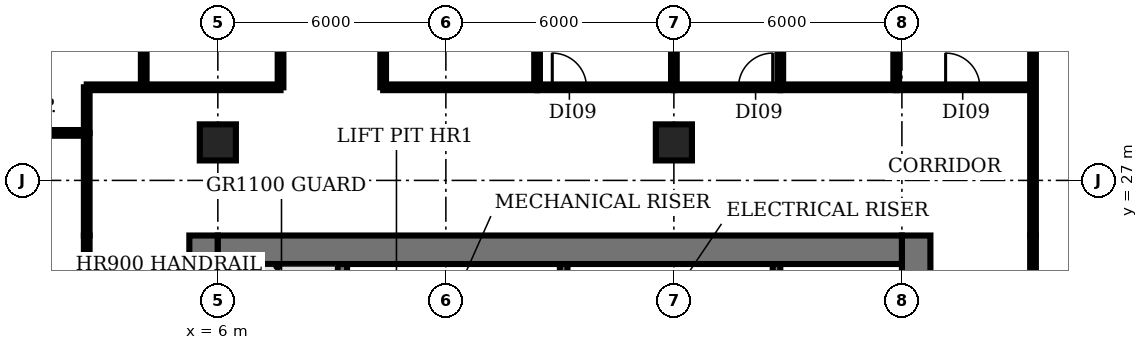
"""IFC4 building model, lengths in metres.
Left out: names, types, materials, properties, quantities, classifications, styles, units other than length and angle.
Written with IfcOpenShell. Run it as: python <this file> out.ifc"""

import sys

from ifc_helpers import new_model, si_unit, direction, frame, frame_2d, origin, origin_2d, place, context, subcontext, project, spatial, rectangle, extrude, element, fill, save


model = new_model("IFC4")
c1 = context("Model", 3, precision=1e-05, world=origin(), true_north=direction((0.0, 1.0)))
c2 = subcontext(c1, "Body", "Model", "MODEL_VIEW")
j1 = project(units=[si_unit("LENGTHUNIT", "METRE"), si_unit("PLANEANGLEUNIT", "RADIAN")], contexts=[c1])
p1 = place(None, origin())
s1 = spatial("IfcSite", under=j1, at=p1, CompositionType="ELEMENT")
p2 = place(p1, origin())
s2 = spatial("IfcBuilding", under=s1, at=p2, CompositionType="ELEMENT")
p3 = place(p2, frame((0.0, 0.0, 134.0)))
s3 = spatial("IfcBuildingStorey", under=s2, at=p3, CompositionType="ELEMENT", Elevation=134.0)
for number, where, z_axis, x_axis in (
    (1, (6.0, 28.0, 0.0), (0.0, 0.0, 1.0), (1.0, 0.0, 0.0)),
    (2, (18.0, 28.0, 0.0), (0.0, 0.0, 1.0), (1.0, 0.0, 0.0)),
):
    element("IfcColumn", number, at=place(p3, frame(where, z_axis=z_axis, x_axis=x_axis)), inside=s3, PredefinedType="COLUMN", context=c2, shape_type="SweptSolid", body=[
        extrude(rectangle(XDim=0.95, YDim=0.95, at=origin_2d()), origin(), (0.0, 0.0, 1.0), 3.2),
    ])
p4 = place(p3, frame((9.275, 18.375, 0.0), z_axis=(0.0, 0.0, 1.0), x_axis=(0.0, 1.0, 0.0)))
e3 = element("IfcWall", 3, at=p4, inside=s3, PredefinedType="SHEAR", context=c2, shape_type="SweptSolid", body=[
    extrude(rectangle(XDim=6.425, YDim=0.25, at=frame_2d((3.212, 0.0))), origin(), (0.0, 0.0, 1.0), 3.8),
])
for number, where, z_axis, x_axis in (
    (4, (15.1, 22.9, 0.0), (0.0, 0.0, 1.0), (0.0, 1.0, 0.0)),
    (5, (20.7, 22.9, 0.0), (0.0, 0.0, 1.0), (0.0, 1.0, 0.0)),
):
    element("IfcWall", number, at=place(p3, frame(where, z_axis=z_axis, x_axis=x_axis)), inside=s3, PredefinedType="SHEAR", context=c2, shape_type="SweptSolid", body=[
        extrude(rectangle(XDim=1.9, YDim=0.2, at=frame_2d((0.95, 0.0))), origin(), (0.0, 0.0, 1.0), 3.8),
    ])
p5 = place(p3, frame((5.625, 4.52, 0.0), z_axis=(0.0, 0.0, 1.0), x_axis=(0.0, 1.0, 0.0)))
e6 = element("IfcWall", 6, at=p5, inside=s3, PredefinedType="SHEAR", context=c2, shape_type="SweptSolid", body=[
    extrude(rectangle(XDim=21.03, YDim=0.75, at=frame_2d((10.515, 0.0))), origin(), (0.0, 0.0, 1.0), 3.8),
])
p6 = place(p5, frame((1.13, 0.0, 0.0)))
e7 = element("IfcOpeningElement", 7, at=p6, cuts=e6, PredefinedType="OPENING", context=c2, shape_type="SweptSolid", body=[
    extrude(rectangle(XDim=1.5, YDim=2.1, at=frame_2d((0.75, 1.05))), frame((0.0, 0.385, 0.0), z_axis=(0.0, -1.0, 0.0), x_axis=(1.0, 0.0, 0.0)), (0.0, 0.0, 1.0), 0.77),
])
p7 = place(p5, frame((7.58, 0.0, 0.0)))
e8 = element("IfcOpeningElement", 8, at=p7, cuts=e6, PredefinedType="OPENING", context=c2, shape_type="SweptSolid", body=[
    extrude(rectangle(XDim=1.2, YDim=2.1, at=frame_2d((0.6, 1.05))), frame((0.0, 0.385, 0.0), z_axis=(0.0, -1.0, 0.0), x_axis=(1.0, 0.0, 0.0)), (0.0, 0.0, 1.0), 0.77),
])
p8 = place(p5, frame((14.13, 0.0, 0.0)))
e9 = element("IfcOpeningElement", 9, at=p8, cuts=e6, PredefinedType="OPENING", context=c2, shape_type="SweptSolid", body=[
    extrude(rectangle(XDim=1.2, YDim=2.1, at=frame_2d((0.6, 1.05))), frame((0.0, 0.385, 0.0), z_axis=(0.0, -1.0, 0.0), x_axis=(1.0, 0.0, 0.0)), (0.0, 0.0, 1.0), 0.77),
])
p9 = place(p3, frame((24.375, 25.55, 0.0), z_axis=(0.0, 0.0, 1.0), x_axis=(0.0, -1.0, 0.0)))
e10 = element("IfcWall", 10, at=p9, inside=s3, PredefinedType="SHEAR", context=c2, shape_type="SweptSolid", body=[
    extrude(rectangle(XDim=21.08, YDim=0.75, at=frame_2d((10.54, 0.0))), origin(), (0.0, 0.0, 1.0), 3.8),
])
p10 = place(p9, frame((18.4, 0.0, 0.0)))
e11 = element("IfcOpeningElement", 11, at=p10, cuts=e10, PredefinedType="OPENING", context=c2, shape_type="SweptSolid", body=[
    extrude(rectangle(XDim=1.5, YDim=2.1, at=frame_2d((0.75, 1.05))), frame((0.0, 0.385, 0.0), z_axis=(0.0, -1.0, 0.0), x_axis=(1.0, 0.0, 0.0)), (0.0, 0.0, 1.0), 0.77),
])
p11 = place(p9, frame((12.3, 0.0, 0.0)))
e12 = element("IfcOpeningElement", 12, at=p11, cuts=e10, PredefinedType="OPENING", context=c2, shape_type="SweptSolid", body=[
    extrude(rectangle(XDim=0.9, YDim=2.1, at=frame_2d((0.45, 1.05))), frame((0.0, 0.385, 0.0), z_axis=(0.0, -1.0, 0.0), x_axis=(1.0, 0.0, 0.0)), (0.0, 0.0, 1.0), 0.77),
])
p12 = place(p9, frame((6.3, 0.0, 0.0)))
e13 = element("IfcOpeningElement", 13, at=p12, cuts=e10, PredefinedType="OPENING", context=c2, shape_type="SweptSolid", body=[
    extrude(rectangle(XDim=2.0, YDim=2.1, at=frame_2d((1.0, 1.05))), frame((0.0, 0.385, 0.0), z_axis=(0.0, -1.0, 0.0), x_axis=(1.0, 0.0, 0.0)), (0.0, 0.0, 1.0), 0.77),
])
p13 = place(p3, frame((6.0, 25.175, 0.0), z_axis=(0.0, 0.0, 1.0), x_axis=(1.0, 0.0, 0.0)))
e14 = element("IfcWall", 14, at=p13, inside=s3, PredefinedType="SHEAR", context=c2, shape_type="SweptSolid", body=[
    extrude(rectangle(XDim=18.0, YDim=0.75, at=frame_2d((9.0, 0.0))), origin(), (0.0, 0.0, 1.0), 3.8),
])
p14 = place(p3, frame((-1.62, 28.25, 0.0), z_axis=(0.0, 0.0, 1.0), x_axis=(1.0, 0.0, 0.0)))
e15 = element("IfcWall", 15, at=p14, inside=s3, PredefinedType="PARTITIONING", context=c2, shape_type="SweptSolid", body=[
    extrude(rectangle(XDim=4.17, YDim=0.15, at=frame_2d((2.085, 0.0))), origin(), (0.0, 0.0, 1.0), 2.78),
])
p15 = place(p3, frame((2.55, 6.03, 0.0), z_axis=(0.0, 0.0, 1.0), x_axis=(0.0, 1.0, 0.0)))
e16 = element("IfcWall", 16, at=p15, inside=s3, PredefinedType="PARTITIONING", context=c2, shape_type="SweptSolid", body=[
    extrude(rectangle(XDim=19.52, YDim=0.15, at=frame_2d((9.76, 0.0))), origin(), (0.0, 0.0, 1.0), 2.78),
])
p16 = place(p15, frame((7.62, 0.0, 0.0)))
e17 = element("IfcOpeningElement", 17, at=p16, cuts=e16, PredefinedType="OPENING", context=c2, shape_type="SweptSolid", body=[
    extrude(rectangle(XDim=1.2, YDim=2.1, at=frame_2d((0.6, 1.05))), frame((0.0, 0.085, 0.0), z_axis=(0.0, -1.0, 0.0), x_axis=(1.0, 0.0, 0.0)), (0.0, 0.0, 1.0), 0.17),
])
p17 = place(p3, frame((2.55, 25.55, 0.0), z_axis=(0.0, 0.0, 1.0), x_axis=(0.0, 1.0, 0.0)))
e18 = element("IfcWall", 18, at=p17, inside=s3, PredefinedType="PARTITIONING", context=c2, shape_type="SweptSolid", body=[
    extrude(rectangle(XDim=2.7, YDim=0.15, at=frame_2d((1.35, 0.0))), origin(), (0.0, 0.0, 1.0), 2.78),
])
p18 = place(p3, frame((2.55, 28.25, 0.0), z_axis=(0.0, 0.0, 1.0), x_axis=(0.0, 1.0, 0.0)))
e19 = element("IfcWall", 19, at=p18, inside=s3, PredefinedType="PARTITIONING", context=c2, shape_type="SweptSolid", body=[
    extrude(rectangle(XDim=1.2, YDim=0.15, at=frame_2d((0.6, 0.0))), origin(), (0.0, 0.0, 1.0), 2.78),
])
p19 = place(p3, frame((2.55, 29.45, 0.0), z_axis=(0.0, 0.0, 1.0), x_axis=(1.0, 0.0, 0.0)))
e20 = element("IfcWall", 20, at=p19, inside=s3, PredefinedType="PARTITIONING", context=c2, shape_type="SweptSolid", body=[
    extrude(rectangle(XDim=5.1, YDim=0.15, at=frame_2d((2.55, 0.0))), origin(), (0.0, 0.0, 1.0), 2.78),
])
p20 = place(p3, frame((4.05, 29.45, 0.0), z_axis=(0.0, 0.0, 1.0), x_axis=(0.0, 1.0, 0.0)))
e21 = element("IfcWall", 21, at=p20, inside=s3, PredefinedType="PARTITIONING", context=c2, shape_type="SweptSolid", body=[
    extrude(rectangle(XDim=4.8, YDim=0.15, at=frame_2d((2.4, 0.0))), origin(), (0.0, 0.0, 1.0), 2.78),
])
p21 = place(p3, frame((7.65, 29.45, 0.0), z_axis=(0.0, 0.0, 1.0), x_axis=(0.0, 1.0, 0.0)))
e22 = element("IfcWall", 22, at=p21, inside=s3, PredefinedType="PARTITIONING", context=c2, shape_type="SweptSolid", body=[
    extrude(rectangle(XDim=4.8, YDim=0.15, at=frame_2d((2.4, 0.0))), origin(), (0.0, 0.0, 1.0), 2.78),
])
p22 = place(p21, frame((1.9, 0.0, 0.0)))
e23 = element("IfcOpeningElement", 23, at=p22, cuts=e22, PredefinedType="OPENING", context=c2, shape_type="SweptSolid", body=[
    extrude(rectangle(XDim=0.9, YDim=2.1, at=frame_2d((0.45, 1.05))), frame((0.0, 0.085, 0.0), z_axis=(0.0, -1.0, 0.0), x_axis=(1.0, 0.0, 0.0)), (0.0, 0.0, 1.0), 0.17),
])
p23 = place(p3, frame((10.35, 29.45, 0.0), z_axis=(0.0, 0.0, 1.0), x_axis=(0.0, 1.0, 0.0)))
e24 = element("IfcWall", 24, at=p23, inside=s3, PredefinedType="PARTITIONING", context=c2, shape_type="SweptSolid", body=[
    extrude(rectangle(XDim=4.8, YDim=0.15, at=frame_2d((2.4, 0.0))), origin(), (0.0, 0.0, 1.0), 2.78),
])
p24 = place(p3, frame((10.35, 29.45, 0.0), z_axis=(0.0, 0.0, 1.0), x_axis=(1.0, 0.0, 0.0)))
e25 = element("IfcWall", 25, at=p24, inside=s3, PredefinedType="PARTITIONING", context=c2, shape_type="SweptSolid", body=[
    extrude(rectangle(XDim=4.05, YDim=0.15, at=frame_2d((2.025, 0.0))), origin(), (0.0, 0.0, 1.0), 2.78),
])
p25 = place(p3, frame((14.4, 29.45, 0.0), z_axis=(0.0, 0.0, 1.0), x_axis=(0.0, 1.0, 0.0)))
e26 = element("IfcWall", 26, at=p25, inside=s3, PredefinedType="PARTITIONING", context=c2, shape_type="SweptSolid", body=[
    extrude(rectangle(XDim=4.8, YDim=0.15, at=frame_2d((2.4, 0.0))), origin(), (0.0, 0.0, 1.0), 2.78),
])
p26 = place(p3, frame((14.4, 29.45, 0.0), z_axis=(0.0, 0.0, 1.0), x_axis=(1.0, 0.0, 0.0)))
e27 = element("IfcWall", 27, at=p26, inside=s3, PredefinedType="PARTITIONING", context=c2, shape_type="SweptSolid", body=[
    extrude(rectangle(XDim=3.6, YDim=0.15, at=frame_2d((1.8, 0.0))), origin(), (0.0, 0.0, 1.0), 2.78),
])
p27 = place(p26, frame((0.4, 0.0, 0.0)))
e28 = element("IfcOpeningElement", 28, at=p27, cuts=e27, PredefinedType="OPENING", context=c2, shape_type="SweptSolid", body=[
    extrude(rectangle(XDim=0.9, YDim=2.1, at=frame_2d((0.45, 1.05))), frame((0.0, 0.085, 0.0), z_axis=(0.0, -1.0, 0.0), x_axis=(1.0, 0.0, 0.0)), (0.0, 0.0, 1.0), 0.17),
])
p28 = place(p3, frame((18.0, 29.45, 0.0), z_axis=(0.0, 0.0, 1.0), x_axis=(0.0, 1.0, 0.0)))
e29 = element("IfcWall", 29, at=p28, inside=s3, PredefinedType="PARTITIONING", context=c2, shape_type="SweptSolid", body=[
    extrude(rectangle(XDim=4.8, YDim=0.15, at=frame_2d((2.4, 0.0))), origin(), (0.0, 0.0, 1.0), 2.78),
])
p29 = place(p3, frame((18.0, 29.45, 0.0), z_axis=(0.0, 0.0, 1.0), x_axis=(1.0, 0.0, 0.0)))
e30 = element("IfcWall", 30, at=p29, inside=s3, PredefinedType="PARTITIONING", context=c2, shape_type="SweptSolid", body=[
    extrude(rectangle(XDim=2.8, YDim=0.15, at=frame_2d((1.4, 0.0))), origin(), (0.0, 0.0, 1.0), 2.78),
])
p30 = place(p29, frame((1.7, 0.0, 0.0)))
e31 = element("IfcOpeningElement", 31, at=p30, cuts=e30, PredefinedType="OPENING", context=c2, shape_type="SweptSolid", body=[
    extrude(rectangle(XDim=0.9, YDim=2.1, at=frame_2d((0.45, 1.05))), frame((0.0, 0.085, 0.0), z_axis=(0.0, -1.0, 0.0), x_axis=(1.0, 0.0, 0.0)), (0.0, 0.0, 1.0), 0.17),
])
p31 = place(p3, frame((20.8, 29.45, 0.0), z_axis=(0.0, 0.0, 1.0), x_axis=(0.0, 1.0, 0.0)))
e32 = element("IfcWall", 32, at=p31, inside=s3, PredefinedType="PARTITIONING", context=c2, shape_type="SweptSolid", body=[
    extrude(rectangle(XDim=4.8, YDim=0.15, at=frame_2d((2.4, 0.0))), origin(), (0.0, 0.0, 1.0), 2.78),
])
p32 = place(p3, frame((20.8, 29.45, 0.0), z_axis=(0.0, 0.0, 1.0), x_axis=(1.0, 0.0, 0.0)))
e33 = element("IfcWall", 33, at=p32, inside=s3, PredefinedType="PARTITIONING", context=c2, shape_type="SweptSolid", body=[
    extrude(rectangle(XDim=3.05, YDim=0.15, at=frame_2d((1.525, 0.0))), origin(), (0.0, 0.0, 1.0), 2.78),
])
p33 = place(p3, frame((23.85, 29.45, 0.0), z_axis=(0.0, 0.0, 1.0), x_axis=(0.0, 1.0, 0.0)))
e34 = element("IfcWall", 34, at=p33, inside=s3, PredefinedType="PARTITIONING", context=c2, shape_type="SweptSolid", body=[
    extrude(rectangle(XDim=4.8, YDim=0.15, at=frame_2d((2.4, 0.0))), origin(), (0.0, 0.0, 1.0), 2.78),
])
p34 = place(p3, frame((23.85, 29.45, 0.0), z_axis=(0.0, 0.0, 1.0), x_axis=(1.0, 0.0, 0.0)))
e35 = element("IfcWall", 35, at=p34, inside=s3, PredefinedType="PARTITIONING", context=c2, shape_type="SweptSolid", body=[
    extrude(rectangle(XDim=3.6, YDim=0.15, at=frame_2d((1.8, 0.0))), origin(), (0.0, 0.0, 1.0), 2.78),
])
p35 = place(p34, frame((1.3, 0.0, 0.0)))
e36 = element("IfcOpeningElement", 36, at=p35, cuts=e35, PredefinedType="OPENING", context=c2, shape_type="SweptSolid", body=[
    extrude(rectangle(XDim=0.9, YDim=2.1, at=frame_2d((0.45, 1.05))), frame((0.0, 0.085, 0.0), z_axis=(0.0, -1.0, 0.0), x_axis=(1.0, 0.0, 0.0)), (0.0, 0.0, 1.0), 0.17),
])
p36 = place(p3, frame((27.45, 25.55, 0.0), z_axis=(0.0, 0.0, 1.0), x_axis=(0.0, -1.0, 0.0)))
e37 = element("IfcWall", 37, at=p36, inside=s3, PredefinedType="PARTITIONING", context=c2, shape_type="SweptSolid", body=[
    extrude(rectangle(XDim=16.45, YDim=0.15, at=frame_2d((8.225, 0.0))), origin(), (0.0, 0.0, 1.0), 2.78),
])
p37 = place(p36, frame((7.55, 0.0, 0.0)))
e38 = element("IfcOpeningElement", 38, at=p37, cuts=e37, PredefinedType="OPENING", context=c2, shape_type="SweptSolid", body=[
    extrude(rectangle(XDim=1.2, YDim=2.1, at=frame_2d((0.6, 1.05))), frame((0.0, 0.085, 0.0), z_axis=(0.0, -1.0, 0.0), x_axis=(1.0, 0.0, 0.0)), (0.0, 0.0, 1.0), 0.17),
])
p38 = place(p3, frame((27.45, 25.55, 0.0), z_axis=(0.0, 0.0, 1.0), x_axis=(0.0, 1.0, 0.0)))
e39 = element("IfcWall", 39, at=p38, inside=s3, PredefinedType="PARTITIONING", context=c2, shape_type="SweptSolid", body=[
    extrude(rectangle(XDim=6.47, YDim=0.15, at=frame_2d((3.235, 0.0))), origin(), (0.0, 0.0, 1.0), 2.78),
])
p39 = place(p27, origin())
e40 = element("IfcDoor", 40, at=p39, inside=s3, OperationType="SINGLE_SWING_LEFT", PredefinedType="DOOR", context=c2, shape_type="SweptSolid", body=[
    extrude(rectangle(XDim=0.9, YDim=2.1, at=frame_2d((0.45, 1.05))), frame((0.0, 0.025, 0.0), z_axis=(0.0, -1.0, 0.0), x_axis=(1.0, 0.0, 0.0)), (0.0, 0.0, 1.0), 0.05),
])
fill(e28, e40)
p40 = place(p30, origin())
e41 = element("IfcDoor", 41, at=p40, inside=s3, OperationType="SINGLE_SWING_RIGHT", PredefinedType="DOOR", context=c2, shape_type="SweptSolid", body=[
    extrude(rectangle(XDim=0.9, YDim=2.1, at=frame_2d((0.45, 1.05))), frame((0.0, 0.025, 0.0), z_axis=(0.0, -1.0, 0.0), x_axis=(1.0, 0.0, 0.0)), (0.0, 0.0, 1.0), 0.05),
])
fill(e31, e41)
p41 = place(p35, origin())
e42 = element("IfcDoor", 42, at=p41, inside=s3, OperationType="SINGLE_SWING_LEFT", PredefinedType="DOOR", context=c2, shape_type="SweptSolid", body=[
    extrude(rectangle(XDim=0.9, YDim=2.1, at=frame_2d((0.45, 1.05))), frame((0.0, 0.025, 0.0), z_axis=(0.0, -1.0, 0.0), x_axis=(1.0, 0.0, 0.0)), (0.0, 0.0, 1.0), 0.05),
])
fill(e36, e42)
save(model, sys.argv[1])
